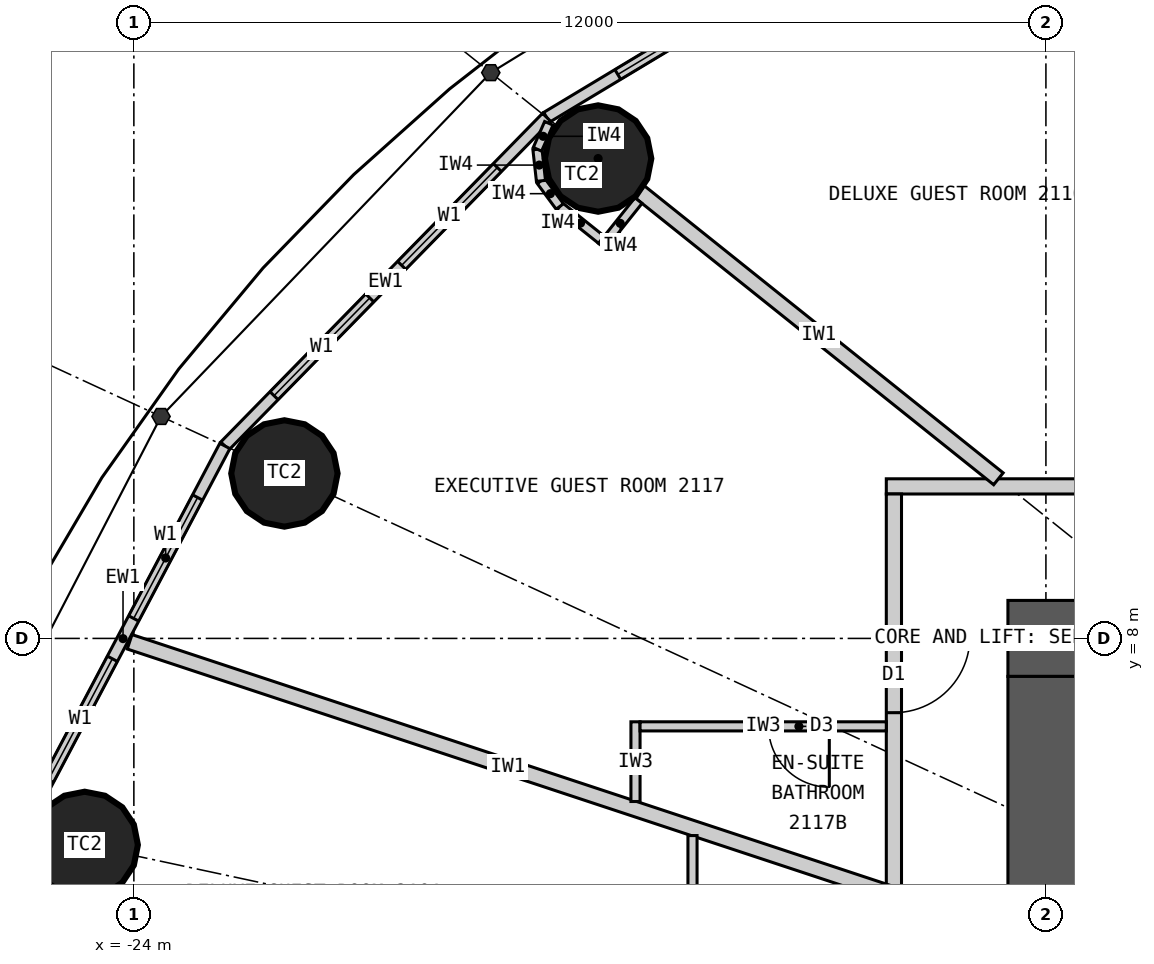
"""IFC4 building model, lengths in metres.
Left out: names, types, materials, properties, quantities, classifications, styles, units other than length and angle.
Written with IfcOpenShell. Run it as: python <this file> out.ifc"""

import sys

from ifc_helpers import new_model, si_unit, direction, frame, frame_2d, origin, origin_2d, place, context, subcontext, project, spatial, rectangle, circle, extrude, element, fill, save


model = new_model("IFC4")
c1 = context("Model", 3, precision=1e-05, world=origin(), true_north=direction((0.0, 1.0)))
c2 = subcontext(c1, "Body", "Model", "MODEL_VIEW")
j1 = project(units=[si_unit("LENGTHUNIT", "METRE"), si_unit("PLANEANGLEUNIT", "RADIAN")], contexts=[c1])
p1 = place(None, origin())
s1 = spatial("IfcSite", under=j1, at=p1, CompositionType="ELEMENT")
p2 = place(p1, origin())
s2 = spatial("IfcBuilding", under=s1, at=p2, CompositionType="ELEMENT")
p3 = place(p2, frame((0.0, 0.0, 83.7)))
s3 = spatial("IfcBuildingStorey", under=s2, at=p3, CompositionType="ELEMENT", Elevation=83.7)
for number, where, z_axis, x_axis in (
    (1, (-17.892, 14.313, 0.0), (0.0, 0.0, 1.0), (1.0, 0.0, 0.0)),
    (2, (-22.019, 10.17, 0.0), (0.0, 0.0, 1.0), (1.0, 0.0, 0.0)),
    (3, (-24.647, 5.283, 0.0), (0.0, 0.0, 1.0), (1.0, 0.0, 0.0)),
):
    element("IfcColumn", number, at=place(p3, frame(where, z_axis=z_axis, x_axis=x_axis)), inside=s3, PredefinedType="COLUMN", context=c2, shape_type="SweptSolid", body=[
        extrude(circle(Radius=0.7, at=origin_2d()), origin(), (0.0, 0.0, 1.0), 3.3),
    ])
p4 = place(p3, frame((-12.5, 8.0, 0.0), z_axis=(0.0, 0.0, 1.0), x_axis=(1.0, 0.0, 0.0)))
e4 = element("IfcWall", 4, at=p4, inside=s3, PredefinedType="SHEAR", context=c2, shape_type="SweptSolid", body=[
    extrude(rectangle(XDim=25.0, YDim=1.0, at=frame_2d((12.5, 0.0))), origin(), (0.0, 0.0, 1.0), 3.3),
])
p5 = place(p4, frame((11.2, 0.0, 0.0)))
e5 = element("IfcOpeningElement", 5, at=p5, cuts=e4, PredefinedType="OPENING", context=c2, shape_type="SweptSolid", body=[
    extrude(rectangle(XDim=1.2, YDim=2.2, at=frame_2d((0.6, 1.1))), frame((0.0, 0.51, 0.0), z_axis=(0.0, -1.0, 0.0), x_axis=(1.0, 0.0, 0.0)), (0.0, 0.0, 1.0), 1.02),
])
p6 = place(p4, frame((18.8, 0.0, 0.0)))
e6 = element("IfcOpeningElement", 6, at=p6, cuts=e4, PredefinedType="OPENING", context=c2, shape_type="SweptSolid", body=[
    extrude(rectangle(XDim=0.9, YDim=2.2, at=frame_2d((0.45, 1.1))), frame((0.0, 0.51, 0.0), z_axis=(0.0, -1.0, 0.0), x_axis=(1.0, 0.0, 0.0)), (0.0, 0.0, 1.0), 1.02),
])
p7 = place(p3, frame((-12.0, 7.5, 0.0), z_axis=(0.0, 0.0, 1.0), x_axis=(0.0, -1.0, 0.0)))
e7 = element("IfcWall", 7, at=p7, inside=s3, PredefinedType="SHEAR", context=c2, shape_type="SweptSolid", body=[
    extrude(rectangle(XDim=15.0, YDim=1.0, at=frame_2d((7.5, 0.0))), origin(), (0.0, 0.0, 1.0), 3.3),
])
p8 = place(p7, frame((6.6, 0.0, 0.0)))
e8 = element("IfcOpeningElement", 8, at=p8, cuts=e7, PredefinedType="OPENING", context=c2, shape_type="SweptSolid", body=[
    extrude(rectangle(XDim=1.8, YDim=2.2, at=frame_2d((0.9, 1.1))), frame((0.0, 0.51, 0.0), z_axis=(0.0, -1.0, 0.0), x_axis=(1.0, 0.0, 0.0)), (0.0, 0.0, 1.0), 1.02),
])
p9 = place(p3, frame((-13.096, 18.147, 0.0), z_axis=(0.0, 0.0, 1.0), x_axis=(-0.856983180864, -0.515344377787, 0.0)))
e9 = element("IfcWall", 9, at=p9, inside=s3, PredefinedType="ELEMENTEDWALL", context=c2, shape_type="SweptSolid", body=[
    extrude(rectangle(XDim=6.386, YDim=0.15, at=frame_2d((3.193, 0.0))), origin(), (0.0, 0.0, 1.0), 3.12),
])
p10 = place(p9, frame((1.093, 0.0, 0.9)))
e10 = element("IfcOpeningElement", 10, at=p10, cuts=e9, PredefinedType="OPENING", context=c2, shape_type="SweptSolid", body=[
    extrude(rectangle(XDim=1.8, YDim=1.9, at=frame_2d((0.9, 0.95))), frame((0.0, 0.085, 0.0), z_axis=(0.0, -1.0, 0.0), x_axis=(1.0, 0.0, 0.0)), (0.0, 0.0, 1.0), 0.17),
])
p11 = place(p9, frame((3.493, 0.0, 0.9)))
e11 = element("IfcOpeningElement", 11, at=p11, cuts=e9, PredefinedType="OPENING", context=c2, shape_type="SweptSolid", body=[
    extrude(rectangle(XDim=1.8, YDim=1.9, at=frame_2d((0.9, 0.95))), frame((0.0, 0.085, 0.0), z_axis=(0.0, -1.0, 0.0), x_axis=(1.0, 0.0, 0.0)), (0.0, 0.0, 1.0), 0.17),
])
p12 = place(p3, frame((-18.57, 14.856, 0.0), z_axis=(0.0, 0.0, 1.0), x_axis=(-0.699602905915, -0.714531856557, 0.0)))
e12 = element("IfcWall", 12, at=p12, inside=s3, PredefinedType="ELEMENTEDWALL", context=c2, shape_type="SweptSolid", body=[
    extrude(rectangle(XDim=6.051, YDim=0.15, at=frame_2d((3.025, 0.0))), origin(), (0.0, 0.0, 1.0), 3.12),
])
p13 = place(p12, frame((0.926, 0.0, 0.9)))
e13 = element("IfcOpeningElement", 13, at=p13, cuts=e12, PredefinedType="OPENING", context=c2, shape_type="SweptSolid", body=[
    extrude(rectangle(XDim=1.8, YDim=1.9, at=frame_2d((0.9, 0.95))), frame((0.0, 0.085, 0.0), z_axis=(0.0, -1.0, 0.0), x_axis=(1.0, 0.0, 0.0)), (0.0, 0.0, 1.0), 0.17),
])
p14 = place(p12, frame((3.325, 0.0, 0.9)))
e14 = element("IfcOpeningElement", 14, at=p14, cuts=e12, PredefinedType="OPENING", context=c2, shape_type="SweptSolid", body=[
    extrude(rectangle(XDim=1.8, YDim=1.9, at=frame_2d((0.9, 0.95))), frame((0.0, 0.085, 0.0), z_axis=(0.0, -1.0, 0.0), x_axis=(1.0, 0.0, 0.0)), (0.0, 0.0, 1.0), 0.17),
])
p15 = place(p3, frame((-22.803, 10.532, 0.0), z_axis=(0.0, 0.0, 1.0), x_axis=(-0.467296867008, -0.884100468321, 0.0)))
e15 = element("IfcWall", 15, at=p15, inside=s3, PredefinedType="ELEMENTEDWALL", context=c2, shape_type="SweptSolid", body=[
    extrude(rectangle(XDim=5.734, YDim=0.15, at=frame_2d((2.867, 0.0))), origin(), (0.0, 0.0, 1.0), 3.12),
])
p16 = place(p15, frame((0.767, 0.0, 0.9)))
e16 = element("IfcOpeningElement", 16, at=p16, cuts=e15, PredefinedType="OPENING", context=c2, shape_type="SweptSolid", body=[
    extrude(rectangle(XDim=1.8, YDim=1.9, at=frame_2d((0.9, 0.95))), frame((0.0, 0.085, 0.0), z_axis=(0.0, -1.0, 0.0), x_axis=(1.0, 0.0, 0.0)), (0.0, 0.0, 1.0), 0.17),
])
p17 = place(p15, frame((3.167, 0.0, 0.9)))
e17 = element("IfcOpeningElement", 17, at=p17, cuts=e15, PredefinedType="OPENING", context=c2, shape_type="SweptSolid", body=[
    extrude(rectangle(XDim=1.8, YDim=1.9, at=frame_2d((0.9, 0.95))), frame((0.0, 0.085, 0.0), z_axis=(0.0, -1.0, 0.0), x_axis=(1.0, 0.0, 0.0)), (0.0, 0.0, 1.0), 0.17),
])
p18 = place(p3, frame((-14.1, 10.0, 0.0), z_axis=(0.0, 0.0, 1.0), x_axis=(1.0, 0.0, 0.0)))
e18 = element("IfcWall", 18, at=p18, inside=s3, PredefinedType="PARTITIONING", context=c2, shape_type="SweptSolid", body=[
    extrude(rectangle(XDim=28.2, YDim=0.2, at=frame_2d((14.1, 0.0))), origin(), (0.0, 0.0, 1.0), 3.12),
])
p19 = place(p18, frame((23.865, 0.0, 0.0)))
e19 = element("IfcOpeningElement", 19, at=p19, cuts=e18, PredefinedType="OPENING", context=c2, shape_type="SweptSolid", body=[
    extrude(rectangle(XDim=1.0, YDim=2.2, at=frame_2d((0.5, 1.1))), frame((0.0, 0.11, 0.0), z_axis=(0.0, -1.0, 0.0), x_axis=(1.0, 0.0, 0.0)), (0.0, 0.0, 1.0), 0.22),
])
p20 = place(p18, frame((18.529, 0.0, 0.0)))
e20 = element("IfcOpeningElement", 20, at=p20, cuts=e18, PredefinedType="OPENING", context=c2, shape_type="SweptSolid", body=[
    extrude(rectangle(XDim=1.0, YDim=2.2, at=frame_2d((0.5, 1.1))), frame((0.0, 0.11, 0.0), z_axis=(0.0, -1.0, 0.0), x_axis=(1.0, 0.0, 0.0)), (0.0, 0.0, 1.0), 0.22),
])
p21 = place(p18, frame((14.623, 0.0, 0.0)))
e21 = element("IfcOpeningElement", 21, at=p21, cuts=e18, PredefinedType="OPENING", context=c2, shape_type="SweptSolid", body=[
    extrude(rectangle(XDim=1.0, YDim=2.2, at=frame_2d((0.5, 1.1))), frame((0.0, 0.11, 0.0), z_axis=(0.0, -1.0, 0.0), x_axis=(1.0, 0.0, 0.0)), (0.0, 0.0, 1.0), 0.22),
])
p22 = place(p18, frame((11.24, 0.0, 0.0)))
e22 = element("IfcOpeningElement", 22, at=p22, cuts=e18, PredefinedType="OPENING", context=c2, shape_type="SweptSolid", body=[
    extrude(rectangle(XDim=1.0, YDim=2.2, at=frame_2d((0.5, 1.1))), frame((0.0, 0.11, 0.0), z_axis=(0.0, -1.0, 0.0), x_axis=(1.0, 0.0, 0.0)), (0.0, 0.0, 1.0), 0.22),
])
p23 = place(p18, frame((8.671, 0.0, 0.0)))
e23 = element("IfcOpeningElement", 23, at=p23, cuts=e18, PredefinedType="OPENING", context=c2, shape_type="SweptSolid", body=[
    extrude(rectangle(XDim=1.0, YDim=2.2, at=frame_2d((0.5, 1.1))), frame((0.0, 0.11, 0.0), z_axis=(0.0, -1.0, 0.0), x_axis=(1.0, 0.0, 0.0)), (0.0, 0.0, 1.0), 0.22),
])
p24 = place(p18, frame((2.801, 0.0, 0.0)))
e24 = element("IfcOpeningElement", 24, at=p24, cuts=e18, PredefinedType="OPENING", context=c2, shape_type="SweptSolid", body=[
    extrude(rectangle(XDim=1.0, YDim=2.2, at=frame_2d((0.5, 1.1))), frame((0.0, 0.11, 0.0), z_axis=(0.0, -1.0, 0.0), x_axis=(1.0, 0.0, 0.0)), (0.0, 0.0, 1.0), 0.22),
])
p25 = place(p3, frame((-14.0, 9.9, 0.0), z_axis=(0.0, 0.0, 1.0), x_axis=(0.0, -1.0, 0.0)))
e25 = element("IfcWall", 25, at=p25, inside=s3, PredefinedType="PARTITIONING", context=c2, shape_type="SweptSolid", body=[
    extrude(rectangle(XDim=19.8, YDim=0.2, at=frame_2d((9.9, 0.0))), origin(), (0.0, 0.0, 1.0), 3.12),
])
p26 = place(p25, frame((7.097, 0.0, 0.0)))
e26 = element("IfcOpeningElement", 26, at=p26, cuts=e25, PredefinedType="OPENING", context=c2, shape_type="SweptSolid", body=[
    extrude(rectangle(XDim=1.0, YDim=2.2, at=frame_2d((0.5, 1.1))), frame((0.0, 0.11, 0.0), z_axis=(0.0, -1.0, 0.0), x_axis=(1.0, 0.0, 0.0)), (0.0, 0.0, 1.0), 0.22),
])
p27 = place(p25, frame((10.778, 0.0, 0.0)))
e27 = element("IfcOpeningElement", 27, at=p27, cuts=e25, PredefinedType="OPENING", context=c2, shape_type="SweptSolid", body=[
    extrude(rectangle(XDim=1.0, YDim=2.2, at=frame_2d((0.5, 1.1))), frame((0.0, 0.11, 0.0), z_axis=(0.0, -1.0, 0.0), x_axis=(1.0, 0.0, 0.0)), (0.0, 0.0, 1.0), 0.22),
])
p28 = place(p25, frame((13.552, 0.0, 0.0)))
e28 = element("IfcOpeningElement", 28, at=p28, cuts=e25, PredefinedType="OPENING", context=c2, shape_type="SweptSolid", body=[
    extrude(rectangle(XDim=1.0, YDim=2.2, at=frame_2d((0.5, 1.1))), frame((0.0, 0.11, 0.0), z_axis=(0.0, -1.0, 0.0), x_axis=(1.0, 0.0, 0.0)), (0.0, 0.0, 1.0), 0.22),
])
p29 = place(p25, frame((18.698, 0.0, 0.0)))
e29 = element("IfcOpeningElement", 29, at=p29, cuts=e25, PredefinedType="OPENING", context=c2, shape_type="SweptSolid", body=[
    extrude(rectangle(XDim=1.0, YDim=2.2, at=frame_2d((0.5, 1.1))), frame((0.0, 0.11, 0.0), z_axis=(0.0, -1.0, 0.0), x_axis=(1.0, 0.0, 0.0)), (0.0, 0.0, 1.0), 0.22),
])
p30 = place(p25, frame((1.877, 0.0, 0.0)))
e30 = element("IfcOpeningElement", 30, at=p30, cuts=e25, PredefinedType="OPENING", context=c2, shape_type="SweptSolid", body=[
    extrude(rectangle(XDim=1.0, YDim=2.2, at=frame_2d((0.5, 1.1))), frame((0.0, 0.11, 0.0), z_axis=(0.0, -1.0, 0.0), x_axis=(1.0, 0.0, 0.0)), (0.0, 0.0, 1.0), 0.22),
])
p31 = place(p3, frame((-7.289, 10.1, 0.0), z_axis=(0.0, 0.0, 1.0), x_axis=(-0.585198353053, 0.810890182197, 0.0)))
e31 = element("IfcWall", 31, at=p31, inside=s3, PredefinedType="PARTITIONING", context=c2, shape_type="SweptSolid", body=[
    extrude(rectangle(XDim=8.36, YDim=0.2, at=frame_2d((4.18, 0.0))), origin(), (0.0, 0.0, 1.0), 2.32),
])
p32 = place(p3, frame((-12.625, 10.1, 0.0), z_axis=(0.0, 0.0, 1.0), x_axis=(-0.780892451574, 0.624665493744, 0.0)))
e32 = element("IfcWall", 32, at=p32, inside=s3, PredefinedType="PARTITIONING", context=c2, shape_type="SweptSolid", body=[
    extrude(rectangle(XDim=6.045, YDim=0.2, at=frame_2d((3.022, 0.0))), origin(), (0.0, 0.0, 1.0), 2.32),
])
p33 = place(p3, frame((-14.1, 4.663, 0.0), z_axis=(0.0, 0.0, 1.0), x_axis=(-0.949432655039, 0.31397075269, 0.0)))
e33 = element("IfcWall", 33, at=p33, inside=s3, PredefinedType="PARTITIONING", context=c2, shape_type="SweptSolid", body=[
    extrude(rectangle(XDim=10.486, YDim=0.2, at=frame_2d((5.243, 0.0))), origin(), (0.0, 0.0, 1.0), 3.12),
])
p34 = place(p3, frame((-16.65, 5.406, 0.0), z_axis=(0.0, 0.0, 1.0), x_axis=(0.0, -1.0, 0.0)))
e34 = element("IfcWall", 34, at=p34, inside=s3, PredefinedType="PARTITIONING", context=c2, shape_type="SweptSolid", body=[
    extrude(rectangle(XDim=2.483, YDim=0.12, at=frame_2d((1.242, 0.0))), origin(), (0.0, 0.0, 1.0), 3.12),
])
p35 = place(p3, frame((-17.4, 5.854, 0.0), z_axis=(0.0, 0.0, 1.0), x_axis=(0.0, 1.0, 0.0)))
e35 = element("IfcWall", 35, at=p35, inside=s3, PredefinedType="PARTITIONING", context=c2, shape_type="SweptSolid", body=[
    extrude(rectangle(XDim=1.049, YDim=0.12, at=frame_2d((0.524, 0.0))), origin(), (0.0, 0.0, 1.0), 3.12),
])
p36 = place(p3, frame((-14.1, 6.843, 0.0), z_axis=(0.0, 0.0, 1.0), x_axis=(-1.0, 0.0, 0.0)))
e36 = element("IfcWall", 36, at=p36, inside=s3, PredefinedType="PARTITIONING", context=c2, shape_type="SweptSolid", body=[
    extrude(rectangle(XDim=3.24, YDim=0.12, at=frame_2d((1.62, 0.0))), origin(), (0.0, 0.0, 1.0), 3.12),
])
p37 = place(p36, frame((0.75, 0.0, 0.0)))
e37 = element("IfcOpeningElement", 37, at=p37, cuts=e36, PredefinedType="OPENING", context=c2, shape_type="SweptSolid", body=[
    extrude(rectangle(XDim=0.8, YDim=2.1, at=frame_2d((0.4, 1.05))), frame((0.0, 0.07, 0.0), z_axis=(0.0, -1.0, 0.0), x_axis=(1.0, 0.0, 0.0)), (0.0, 0.0, 1.0), 0.14),
])
p38 = place(p3, frame((-17.361, 13.76, 0.0), z_axis=(0.0, 0.0, 1.0), x_axis=(-0.624501042889, -0.781023973659, 0.0)))
e38 = element("IfcWall", 38, at=p38, inside=s3, PredefinedType="PARTITIONING", context=c2, shape_type="SweptSolid", body=[
    extrude(rectangle(XDim=0.767, YDim=0.12, at=frame_2d((0.384, 0.0))), origin(), (0.0, 0.0, 1.0), 3.12),
])
p39 = place(p3, frame((-17.85, 13.246, 0.0), z_axis=(0.0, 0.0, 1.0), x_axis=(-0.780902834923, 0.62465251333, 0.0)))
e39 = element("IfcWall", 39, at=p39, inside=s3, PredefinedType="PARTITIONING", context=c2, shape_type="SweptSolid", body=[
    extrude(rectangle(XDim=0.7, YDim=0.12, at=frame_2d((0.35, 0.0))), origin(), (0.0, 0.0, 1.0), 3.12),
])
for number, where, z_axis, x_axis in (
    (40, (-18.396, 13.683, 0.0), (0.0, 0.0, 1.0), (-0.592, 0.806, 0.0)),
    (41, (-18.644, 14.02, 0.0), (0.0, 0.0, 1.0), (-0.11, 0.994, 0.0)),
):
    element("IfcWall", number, at=place(p3, frame(where, z_axis=z_axis, x_axis=x_axis)), inside=s3, PredefinedType="PARTITIONING", context=c2, shape_type="SweptSolid", body=[
        extrude(rectangle(XDim=0.418, YDim=0.12, at=frame_2d((0.209, 0.0))), origin(), (0.0, 0.0, 1.0), 3.12),
    ])
p40 = place(p3, frame((-18.69, 14.435, 0.0), z_axis=(0.0, 0.0, 1.0), x_axis=(0.401093412634, 0.91603715773, 0.0)))
e42 = element("IfcWall", 42, at=p40, inside=s3, PredefinedType="PARTITIONING", context=c2, shape_type="SweptSolid", body=[
    extrude(rectangle(XDim=0.373, YDim=0.12, at=frame_2d((0.187, 0.0))), origin(), (0.0, 0.0, 1.0), 3.12),
])
p41 = place(p11, origin())
e43 = element("IfcWindow", 43, at=p41, inside=s3, PartitioningType="SINGLE_PANEL", PredefinedType="WINDOW", context=c2, shape_type="SweptSolid", body=[
    extrude(rectangle(XDim=1.8, YDim=1.9, at=frame_2d((0.9, 0.95))), frame((0.0, 0.03, 0.0), z_axis=(0.0, -1.0, 0.0), x_axis=(1.0, 0.0, 0.0)), (0.0, 0.0, 1.0), 0.06),
])
fill(e11, e43)
p42 = place(p13, origin())
e44 = element("IfcWindow", 44, at=p42, inside=s3, PartitioningType="SINGLE_PANEL", PredefinedType="WINDOW", context=c2, shape_type="SweptSolid", body=[
    extrude(rectangle(XDim=1.8, YDim=1.9, at=frame_2d((0.9, 0.95))), frame((0.0, 0.03, 0.0), z_axis=(0.0, -1.0, 0.0), x_axis=(1.0, 0.0, 0.0)), (0.0, 0.0, 1.0), 0.06),
])
fill(e13, e44)
p43 = place(p14, origin())
e45 = element("IfcWindow", 45, at=p43, inside=s3, PartitioningType="SINGLE_PANEL", PredefinedType="WINDOW", context=c2, shape_type="SweptSolid", body=[
    extrude(rectangle(XDim=1.8, YDim=1.9, at=frame_2d((0.9, 0.95))), frame((0.0, 0.03, 0.0), z_axis=(0.0, -1.0, 0.0), x_axis=(1.0, 0.0, 0.0)), (0.0, 0.0, 1.0), 0.06),
])
fill(e14, e45)
p44 = place(p16, origin())
e46 = element("IfcWindow", 46, at=p44, inside=s3, PartitioningType="SINGLE_PANEL", PredefinedType="WINDOW", context=c2, shape_type="SweptSolid", body=[
    extrude(rectangle(XDim=1.8, YDim=1.9, at=frame_2d((0.9, 0.95))), frame((0.0, 0.03, 0.0), z_axis=(0.0, -1.0, 0.0), x_axis=(1.0, 0.0, 0.0)), (0.0, 0.0, 1.0), 0.06),
])
fill(e16, e46)
p45 = place(p17, origin())
e47 = element("IfcWindow", 47, at=p45, inside=s3, PartitioningType="SINGLE_PANEL", PredefinedType="WINDOW", context=c2, shape_type="SweptSolid", body=[
    extrude(rectangle(XDim=1.8, YDim=1.9, at=frame_2d((0.9, 0.95))), frame((0.0, 0.03, 0.0), z_axis=(0.0, -1.0, 0.0), x_axis=(1.0, 0.0, 0.0)), (0.0, 0.0, 1.0), 0.06),
])
fill(e17, e47)
p46 = place(p37, origin())
e48 = element("IfcDoor", 48, at=p46, inside=s3, OperationType="SINGLE_SWING_LEFT", PredefinedType="DOOR", context=c2, shape_type="SweptSolid", body=[
    extrude(rectangle(XDim=0.8, YDim=2.1, at=frame_2d((0.4, 1.05))), frame((0.0, 0.025, 0.0), z_axis=(0.0, -1.0, 0.0), x_axis=(1.0, 0.0, 0.0)), (0.0, 0.0, 1.0), 0.05),
])
fill(e37, e48)
p47 = place(p30, origin())
e49 = element("IfcDoor", 49, at=p47, inside=s3, OperationType="SINGLE_SWING_LEFT", PredefinedType="DOOR", context=c2, shape_type="SweptSolid", body=[
    extrude(rectangle(XDim=1.0, YDim=2.2, at=frame_2d((0.5, 1.1))), frame((0.0, 0.025, 0.0), z_axis=(0.0, -1.0, 0.0), x_axis=(1.0, 0.0, 0.0)), (0.0, 0.0, 1.0), 0.05),
])
fill(e30, e49)
save(model, sys.argv[1])
